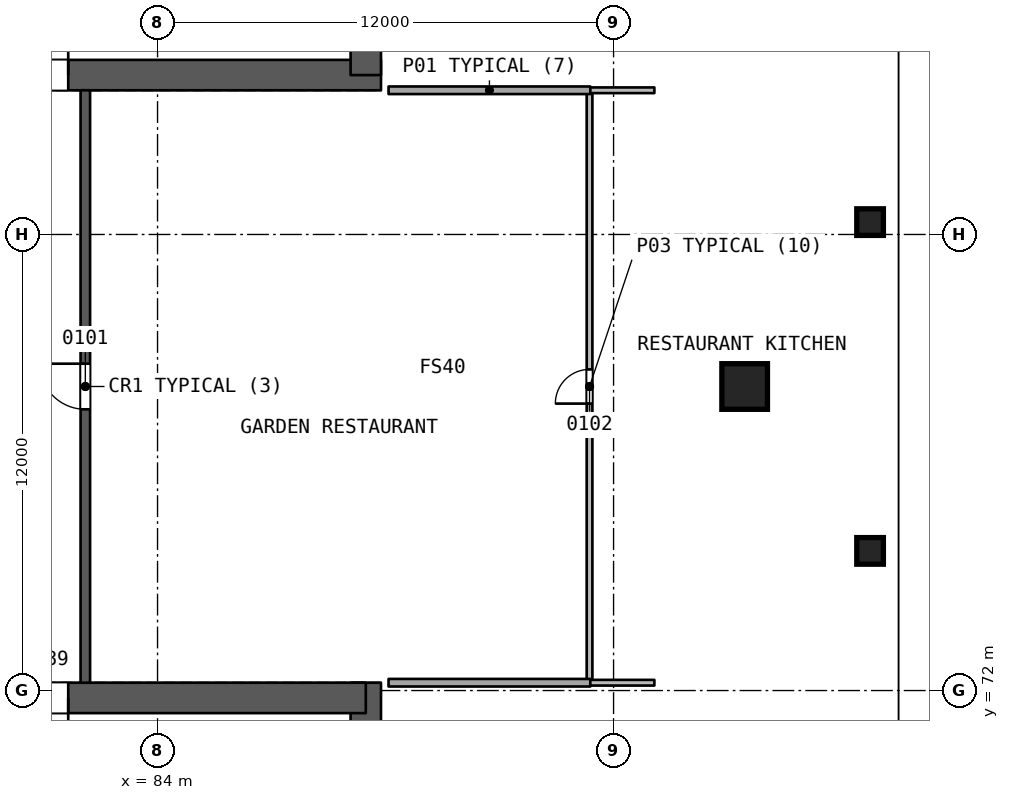
"""IFC4 building model, lengths in metres.
Left out: names, types, materials, properties, quantities, classifications, styles, units other than length and angle.
Written with IfcOpenShell. Run it as: python <this file> out.ifc"""

import sys

from ifc_helpers import new_model, si_unit, direction, frame, frame_2d, origin, origin_2d, place, context, subcontext, project, spatial, rectangle, extrude, element, fill, save


model = new_model("IFC4")
c1 = context("Model", 3, precision=1e-05, world=origin(), true_north=direction((0.0, 1.0)))
c2 = subcontext(c1, "Body", "Model", "MODEL_VIEW")
j1 = project(units=[si_unit("LENGTHUNIT", "METRE"), si_unit("PLANEANGLEUNIT", "RADIAN")], contexts=[c1])
p1 = place(None, origin())
s1 = spatial("IfcSite", under=j1, at=p1, CompositionType="ELEMENT")
p2 = place(p1, origin())
s2 = spatial("IfcBuilding", under=s1, at=p2, CompositionType="ELEMENT")
p3 = place(p2, frame((0.0, 0.0, 9.0)))
s3 = spatial("IfcBuildingStorey", under=s2, at=p3, CompositionType="ELEMENT", Elevation=9.0)
p4 = place(p3, frame((79.731, 88.194, 0.0), z_axis=(0.0, 0.0, 1.0), x_axis=(1.0, 0.0, 0.0)))
e1 = element("IfcWall", 1, at=p4, inside=s3, PredefinedType="SHEAR", context=c2, shape_type="SweptSolid", body=[
    extrude(rectangle(XDim=10.149, YDim=0.8, at=frame_2d((5.074, 0.0))), origin(), (0.0, 0.0, 1.0), 6.0),
])
p5 = place(p4, frame((0.719, 0.0, 0.0)))
e2 = element("IfcOpeningElement", 2, at=p5, cuts=e1, PredefinedType="OPENING", context=c2, shape_type="SweptSolid", body=[
    extrude(rectangle(XDim=1.2, YDim=2.1, at=frame_2d((0.6, 1.05))), frame((0.0, 0.411, 0.0), z_axis=(0.0, -1.0, 0.0), x_axis=(1.0, 0.0, 0.0)), (0.0, 0.0, 1.0), 0.821),
])
p6 = place(p3, frame((89.48, 88.194, 0.0), z_axis=(0.0, 0.0, 1.0), x_axis=(0.0, 1.0, 0.0)))
e3 = element("IfcWall", 3, at=p6, inside=s3, PredefinedType="SHEAR", context=c2, shape_type="SweptSolid", body=[
    extrude(rectangle(XDim=13.933, YDim=0.8, at=frame_2d((6.967, 0.0))), origin(), (0.0, 0.0, 1.0), 6.0),
])
p7 = place(p3, frame((89.48, 58.103, 0.0), z_axis=(0.0, 0.0, 1.0), x_axis=(0.0, 1.0, 0.0)))
e4 = element("IfcWall", 4, at=p7, inside=s3, PredefinedType="SHEAR", context=c2, shape_type="SweptSolid", body=[
    extrude(rectangle(XDim=14.103, YDim=0.8, at=frame_2d((7.051, 0.0))), origin(), (0.0, 0.0, 1.0), 6.0),
])
p8 = place(p3, frame((89.48, 71.806, 0.0), z_axis=(0.0, 0.0, 1.0), x_axis=(-1.0, 0.0, 0.0)))
e5 = element("IfcWall", 5, at=p8, inside=s3, PredefinedType="SHEAR", context=c2, shape_type="SweptSolid", body=[
    extrude(rectangle(XDim=9.98, YDim=0.8, at=frame_2d((4.99, 0.0))), origin(), (0.0, 0.0, 1.0), 6.0),
])
p9 = place(p8, frame((7.83, 0.0, 0.0)))
e6 = element("IfcOpeningElement", 6, at=p9, cuts=e5, PredefinedType="OPENING", context=c2, shape_type="SweptSolid", body=[
    extrude(rectangle(XDim=1.2, YDim=2.1, at=frame_2d((0.6, 1.05))), frame((0.0, 0.411, 0.0), z_axis=(0.0, -1.0, 0.0), x_axis=(1.0, 0.0, 0.0)), (0.0, 0.0, 1.0), 0.821),
])
p10 = place(p3, frame((82.1, 72.206, 0.0), z_axis=(0.0, 0.0, 1.0), x_axis=(0.0, 1.0, 0.0)))
e7 = element("IfcWall", 7, at=p10, inside=s3, PredefinedType="SHEAR", context=c2, shape_type="SweptSolid", body=[
    extrude(rectangle(XDim=15.588, YDim=0.25, at=frame_2d((7.794, 0.0))), origin(), (0.0, 0.0, 1.0), 5.6),
])
p11 = place(p10, frame((7.194, 0.0, 0.0)))
e8 = element("IfcOpeningElement", 8, at=p11, cuts=e7, PredefinedType="OPENING", context=c2, shape_type="SweptSolid", body=[
    extrude(rectangle(XDim=1.2, YDim=2.4, at=frame_2d((0.6, 1.2))), frame((0.0, 0.135, 0.0), z_axis=(0.0, -1.0, 0.0), x_axis=(1.0, 0.0, 0.0)), (0.0, 0.0, 1.0), 0.271),
])
p12 = place(p3, frame((99.474, 80.0, 0.0), z_axis=(-0.020178182547, 0.0, 0.999796399748), x_axis=(0.0, -1.0, 0.0)))
e9 = element("IfcColumn", 9, at=p12, inside=s3, PredefinedType="COLUMN", context=c2, shape_type="SweptSolid", body=[
    extrude(rectangle(XDim=1.2, YDim=1.2, at=origin_2d()), origin(), (0.0, 0.0, 1.0), 6.001),
])
for number, where, z_axis, x_axis in (
    (10, (102.75, 75.674, 0.0), (0.0, 0.0, 1.0), (1.0, 0.0, 0.0)),
    (11, (102.75, 84.326, 0.0), (0.0, 0.0, 1.0), (1.0, 0.0, 0.0)),
):
    element("IfcColumn", number, at=place(p3, frame(where, z_axis=z_axis, x_axis=x_axis)), inside=s3, PredefinedType="COLUMN", context=c2, shape_type="SweptSolid", body=[
        extrude(rectangle(XDim=0.7, YDim=0.7, at=origin_2d()), origin(), (0.0, 0.0, 1.0), 6.0),
    ])
p13 = place(p3, frame((95.368, 72.206, 0.0), z_axis=(0.0, 0.0, 1.0), x_axis=(0.0, 1.0, 0.0)))
e12 = element("IfcWall", 12, at=p13, inside=s3, PredefinedType="PARTITIONING", context=c2, shape_type="SweptSolid", body=[
    extrude(rectangle(XDim=15.588, YDim=0.15, at=frame_2d((7.794, 0.0))), origin(), (0.0, 0.0, 1.0), 5.6),
])
p14 = place(p13, frame((7.344, 0.0, 0.0)))
e13 = element("IfcOpeningElement", 13, at=p14, cuts=e12, PredefinedType="OPENING", context=c2, shape_type="SweptSolid", body=[
    extrude(rectangle(XDim=0.9, YDim=2.1, at=frame_2d((0.45, 1.05))), frame((0.0, 0.085, 0.0), z_axis=(0.0, -1.0, 0.0), x_axis=(1.0, 0.0, 0.0)), (0.0, 0.0, 1.0), 0.171),
])
for number, where, z_axis, x_axis in (
    (14, (95.388, 87.794, 0.0), (0.0, 0.0, 1.0), (-1.0, 0.0, 0.0)),
    (15, (90.079, 72.206, 0.0), (0.0, 0.0, 1.0), (1.0, 0.0, 0.0)),
):
    element("IfcWall", number, at=place(p3, frame(where, z_axis=z_axis, x_axis=x_axis)), inside=s3, PredefinedType="PARTITIONING", context=c2, shape_type="SweptSolid", body=[
        extrude(rectangle(XDim=5.309, YDim=0.2, at=frame_2d((2.654, 0.0))), origin(), (0.0, 0.0, 1.0), 5.6),
    ])
for number, where, z_axis, x_axis in (
    (16, (97.074, 87.794, 0.0), (0.0, 0.0, 1.0), (-1.0, 0.0, 0.0)),
    (17, (95.348, 72.206, 0.0), (0.0, 0.0, 1.0), (1.0, 0.0, 0.0)),
):
    element("IfcWall", number, at=place(p3, frame(where, z_axis=z_axis, x_axis=x_axis)), inside=s3, PredefinedType="PARTITIONING", context=c2, shape_type="SweptSolid", body=[
        extrude(rectangle(XDim=1.726, YDim=0.15, at=frame_2d((0.863, 0.0))), origin(), (0.0, 0.0, 1.0), 5.6),
    ])
p15 = place(p11, origin())
e18 = element("IfcDoor", 18, at=p15, inside=s3, OperationType="SINGLE_SWING_RIGHT", PredefinedType="NOTDEFINED", context=c2, shape_type="SweptSolid", body=[
    extrude(rectangle(XDim=1.2, YDim=2.4, at=frame_2d((0.6, 1.2))), frame((0.0, 0.025, 0.0), z_axis=(0.0, -1.0, 0.0), x_axis=(1.0, 0.0, 0.0)), (0.0, 0.0, 1.0), 0.05),
])
fill(e8, e18)
p16 = place(p14, origin())
e19 = element("IfcDoor", 19, at=p16, inside=s3, OperationType="SINGLE_SWING_LEFT", PredefinedType="NOTDEFINED", context=c2, shape_type="SweptSolid", body=[
    extrude(rectangle(XDim=0.9, YDim=2.1, at=frame_2d((0.45, 1.05))), frame((0.0, 0.025, 0.0), z_axis=(0.0, -1.0, 0.0), x_axis=(1.0, 0.0, 0.0)), (0.0, 0.0, 1.0), 0.05),
])
fill(e13, e19)
p17 = place(p5, origin())
e20 = element("IfcDoor", 20, at=p17, inside=s3, OperationType="SINGLE_SWING_RIGHT", PredefinedType="NOTDEFINED", context=c2, shape_type="SweptSolid", body=[
    extrude(rectangle(XDim=1.2, YDim=2.1, at=frame_2d((0.6, 1.05))), frame((0.0, 0.025, 0.0), z_axis=(0.0, -1.0, 0.0), x_axis=(1.0, 0.0, 0.0)), (0.0, 0.0, 1.0), 0.05),
])
fill(e2, e20)
p18 = place(p9, origin())
e21 = element("IfcDoor", 21, at=p18, inside=s3, OperationType="SINGLE_SWING_LEFT", PredefinedType="NOTDEFINED", context=c2, shape_type="SweptSolid", body=[
    extrude(rectangle(XDim=1.2, YDim=2.1, at=frame_2d((0.6, 1.05))), frame((0.0, 0.025, 0.0), z_axis=(0.0, -1.0, 0.0), x_axis=(1.0, 0.0, 0.0)), (0.0, 0.0, 1.0), 0.05),
])
fill(e6, e21)
save(model, sys.argv[1])
